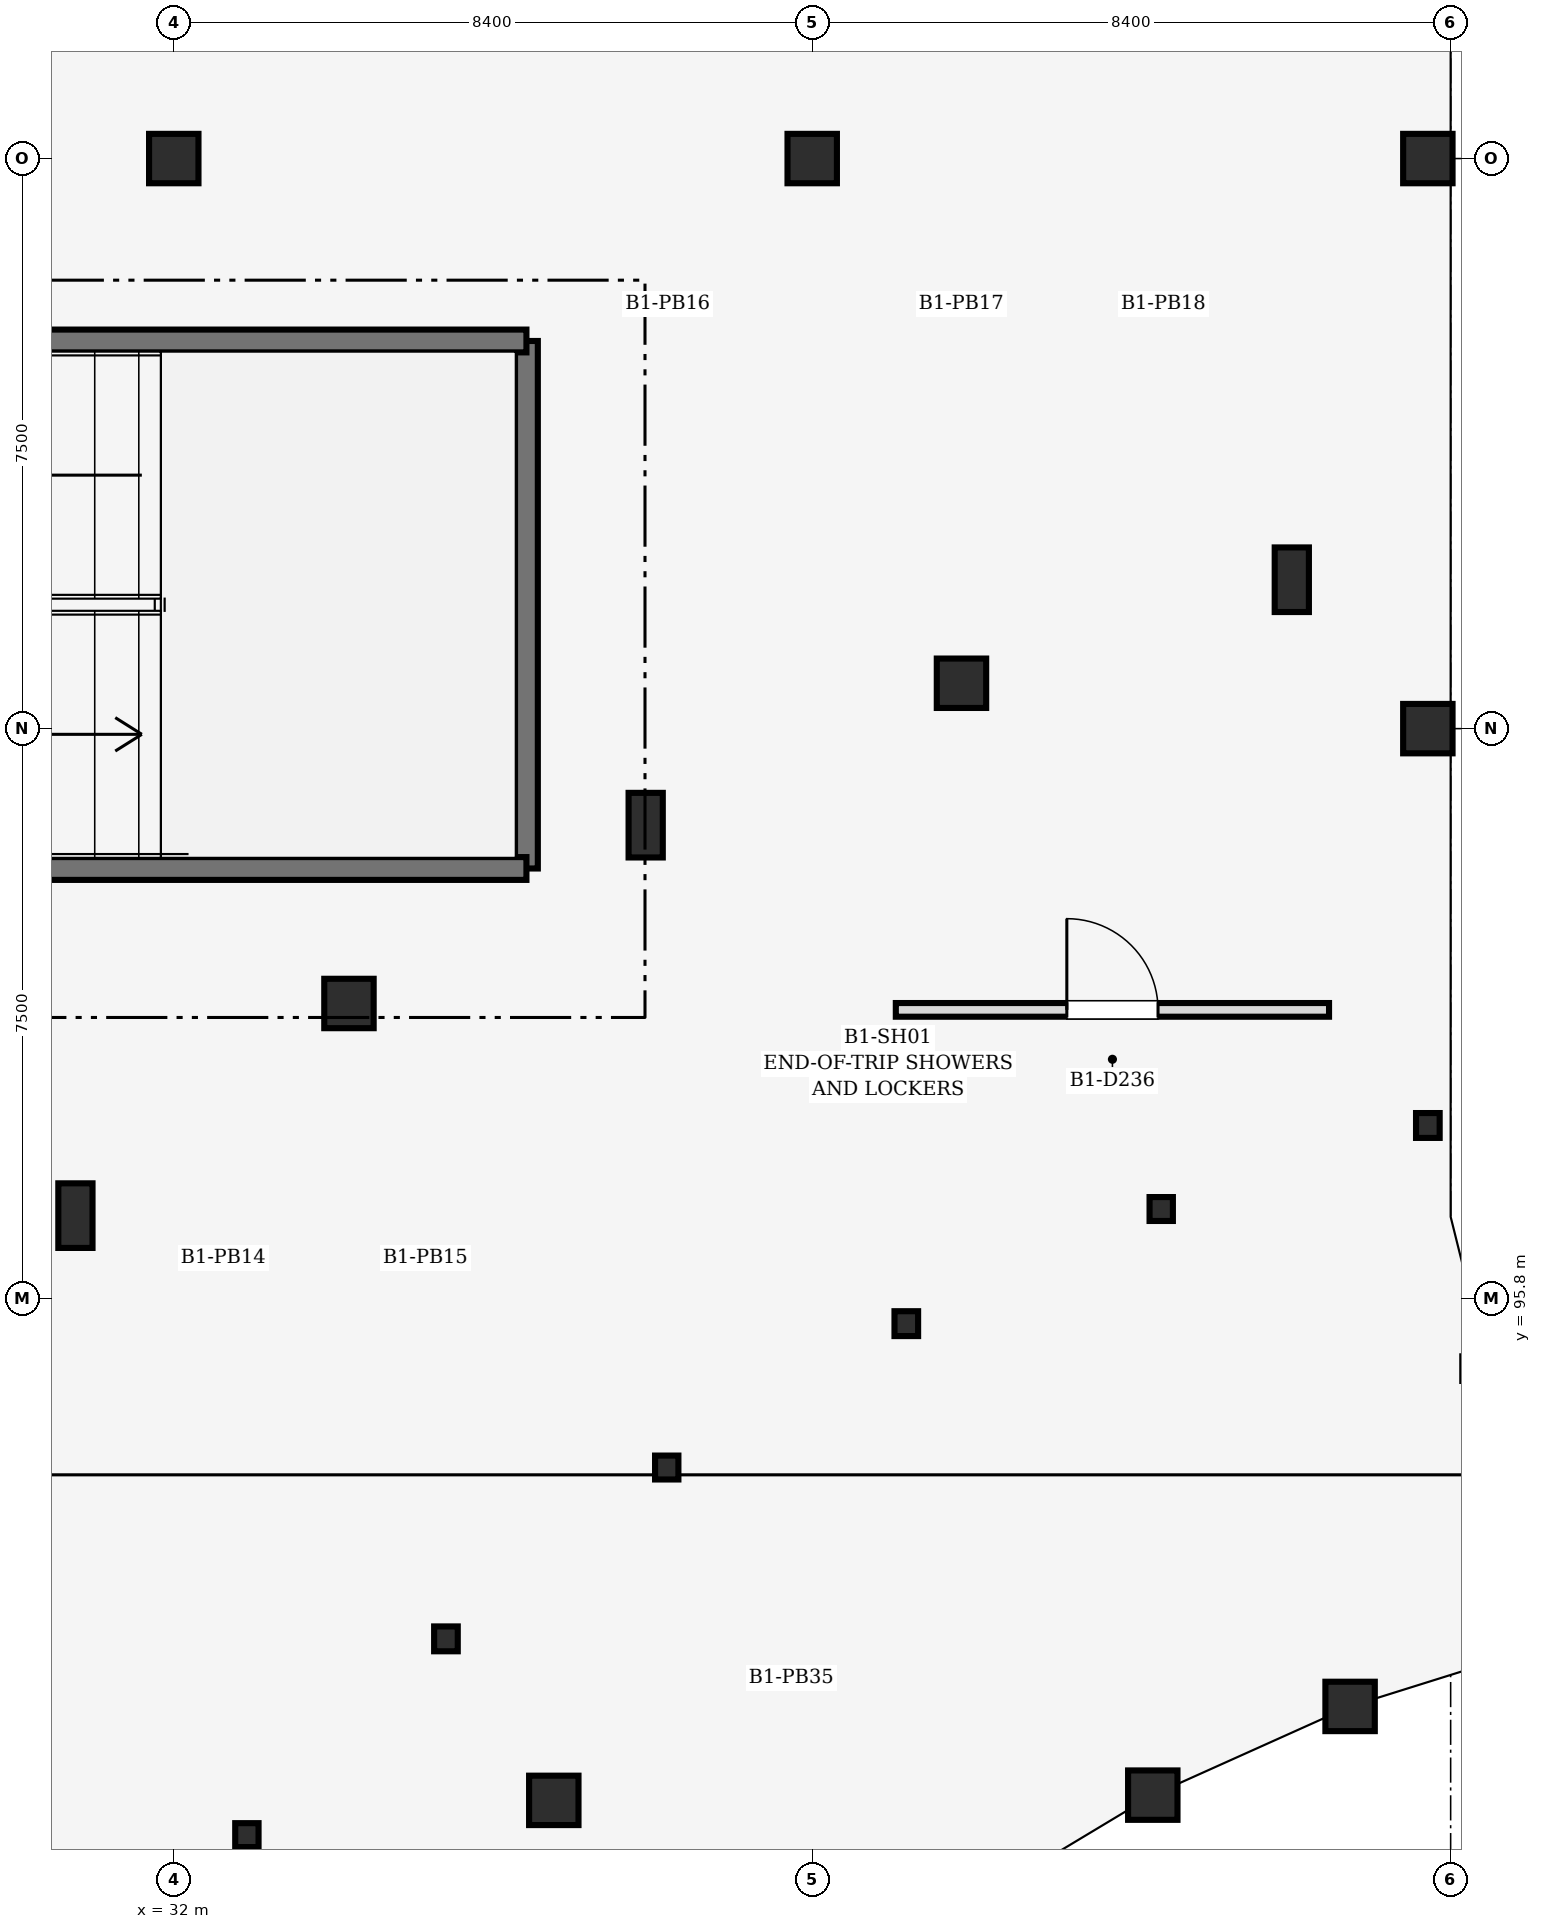
"""IFC4 building model, lengths in metres.
Left out: names, types, materials, properties, quantities, classifications, styles, units other than length and angle.
Written with IfcOpenShell. Run it as: python <this file> out.ifc"""

import sys

from ifc_helpers import new_model, si_unit, direction, frame, frame_2d, origin, origin_2d, place, context, subcontext, project, spatial, rectangle, i_section, extrude, element, fill, save


model = new_model("IFC4")
c1 = context("Model", 3, precision=1e-05, world=origin(), true_north=direction((0.0, 1.0)))
c2 = subcontext(c1, "Body", "Model", "MODEL_VIEW")
j1 = project(units=[si_unit("LENGTHUNIT", "METRE"), si_unit("PLANEANGLEUNIT", "RADIAN")], contexts=[c1])
p1 = place(None, origin())
s1 = spatial("IfcSite", under=j1, at=p1, CompositionType="ELEMENT")
p2 = place(p1, origin())
s2 = spatial("IfcBuilding", under=s1, at=p2, CompositionType="ELEMENT")
p3 = place(p2, frame((0.0, 0.0, -4.8)))
s3 = spatial("IfcBuildingStorey", under=s2, at=p3, CompositionType="ELEMENT", Elevation=-4.8)
p4 = place(p3, frame((48.5, 98.079, 0.0), z_axis=(0.0, 0.0, 1.0), x_axis=(1.0, 0.0, 0.0)))
e1 = element("IfcColumn", 1, at=p4, inside=s3, PredefinedType="COLUMN", context=c2, shape_type="SweptSolid", body=[
    extrude(i_section(OverallWidth=0.311, OverallDepth=0.327, WebThickness=0.016, FlangeThickness=0.025, at=origin_2d()), origin(), (0.0, 0.0, 1.0), 4.8),
])
p5 = place(p3, frame((46.71, 105.259, 0.0), z_axis=(0.0, 0.0, 1.0), x_axis=(1.0, 0.0, 0.0)))
e2 = element("IfcColumn", 2, at=p5, inside=s3, PredefinedType="PILASTER", context=c2, shape_type="SweptSolid", body=[
    extrude(rectangle(XDim=0.45, YDim=0.85, at=origin_2d()), origin(), (0.0, 0.0, 1.0), 4.8),
])
p6 = place(p3, frame((47.477, 90.436, 0.0), z_axis=(0.0, 0.0, 1.0), x_axis=(1.0, 0.0, 0.0)))
e3 = element("IfcColumn", 3, at=p6, inside=s3, PredefinedType="COLUMN", context=c2, shape_type="SweptSolid", body=[
    extrude(rectangle(XDim=0.65, YDim=0.65, at=origin_2d()), origin(), (0.0, 0.0, 1.0), 4.8),
])
p7 = place(p3, frame((44.992, 96.98, 0.0), z_axis=(0.0, 0.0, 1.0), x_axis=(1.0, 0.0, 0.0)))
e4 = element("IfcColumn", 4, at=p7, inside=s3, PredefinedType="COLUMN", context=c2, shape_type="SweptSolid", body=[
    extrude(i_section(OverallWidth=0.307, OverallDepth=0.315, WebThickness=0.012, FlangeThickness=0.019, at=origin_2d()), origin(), (0.0, 0.0, 1.0), 4.8),
])
for number, where, z_axis, x_axis in (
    (5, (42.364, 103.897, 0.0), (0.0, 0.0, 1.0), (1.0, 0.0, 0.0)),
    (6, (44.881, 89.269, 0.0), (0.0, 0.0, 1.0), (1.0, 0.0, 0.0)),
):
    element("IfcColumn", number, at=place(p3, frame(where, z_axis=z_axis, x_axis=x_axis)), inside=s3, PredefinedType="COLUMN", context=c2, shape_type="SweptSolid", body=[
        extrude(rectangle(XDim=0.65, YDim=0.65, at=origin_2d()), origin(), (0.0, 0.0, 1.0), 4.8),
    ])
p8 = place(p3, frame((41.638, 95.472, 0.0), z_axis=(0.0, 0.0, 1.0), x_axis=(1.0, 0.0, 0.0)))
e7 = element("IfcColumn", 7, at=p8, inside=s3, PredefinedType="COLUMN", context=c2, shape_type="SweptSolid", body=[
    extrude(i_section(OverallWidth=0.311, OverallDepth=0.327, WebThickness=0.016, FlangeThickness=0.025, at=origin_2d()), origin(), (0.0, 0.0, 1.0), 4.8),
])
p9 = place(p3, frame((38.209, 102.03, 0.0), z_axis=(0.0, 0.0, 1.0), x_axis=(1.0, 0.0, 0.0)))
e8 = element("IfcColumn", 8, at=p9, inside=s3, PredefinedType="PILASTER", context=c2, shape_type="SweptSolid", body=[
    extrude(rectangle(XDim=0.45, YDim=0.85, at=origin_2d()), origin(), (0.0, 0.0, 1.0), 4.8),
])
p10 = place(p3, frame((38.486, 93.579, 0.0), z_axis=(0.0, 0.0, 1.0), x_axis=(1.0, 0.0, 0.0)))
e9 = element("IfcColumn", 9, at=p10, inside=s3, PredefinedType="COLUMN", context=c2, shape_type="SweptSolid", body=[
    extrude(i_section(OverallWidth=0.307, OverallDepth=0.315, WebThickness=0.012, FlangeThickness=0.019, at=origin_2d()), origin(), (0.0, 0.0, 1.0), 4.8),
])
p11 = place(p3, frame((34.305, 99.684, 0.0), z_axis=(0.0, 0.0, 1.0), x_axis=(1.0, 0.0, 0.0)))
e10 = element("IfcColumn", 10, at=p11, inside=s3, PredefinedType="COLUMN", context=c2, shape_type="SweptSolid", body=[
    extrude(rectangle(XDim=0.65, YDim=0.65, at=origin_2d()), origin(), (0.0, 0.0, 1.0), 4.8),
])
p12 = place(p3, frame((35.581, 91.325, 0.0), z_axis=(0.0, 0.0, 1.0), x_axis=(1.0, 0.0, 0.0)))
e11 = element("IfcColumn", 11, at=p12, inside=s3, PredefinedType="COLUMN", context=c2, shape_type="SweptSolid", body=[
    extrude(i_section(OverallWidth=0.311, OverallDepth=0.327, WebThickness=0.016, FlangeThickness=0.025, at=origin_2d()), origin(), (0.0, 0.0, 1.0), 4.8),
])
p13 = place(p3, frame((30.706, 96.893, 0.0), z_axis=(0.0, 0.0, 1.0), x_axis=(1.0, 0.0, 0.0)))
e12 = element("IfcColumn", 12, at=p13, inside=s3, PredefinedType="PILASTER", context=c2, shape_type="SweptSolid", body=[
    extrude(rectangle(XDim=0.45, YDim=0.85, at=origin_2d()), origin(), (0.0, 0.0, 1.0), 4.8),
])
p14 = place(p3, frame((32.962, 88.743, 0.0), z_axis=(0.0, 0.0, 1.0), x_axis=(1.0, 0.0, 0.0)))
e13 = element("IfcColumn", 13, at=p14, inside=s3, PredefinedType="COLUMN", context=c2, shape_type="SweptSolid", body=[
    extrude(i_section(OverallWidth=0.307, OverallDepth=0.315, WebThickness=0.012, FlangeThickness=0.019, at=origin_2d()), origin(), (0.0, 0.0, 1.0), 4.8),
])
for number, where, z_axis, x_axis in (
    (14, (32.0, 110.8, 0.0), (0.0, 0.0, 1.0), (1.0, 0.0, 0.0)),
    (15, (40.4, 110.8, 0.0), (0.0, 0.0, 1.0), (1.0, 0.0, 0.0)),
    (16, (48.5, 103.3, 0.0), (0.0, 0.0, 1.0), (1.0, 0.0, 0.0)),
    (17, (48.5, 110.8, 0.0), (0.0, 0.0, 1.0), (1.0, 0.0, 0.0)),
    (18, (37.0, 89.2, 0.0), (0.0, 0.0, 1.0), (1.0, 0.0, 0.0)),
):
    element("IfcColumn", number, at=place(p3, frame(where, z_axis=z_axis, x_axis=x_axis)), inside=s3, PredefinedType="COLUMN", context=c2, shape_type="SweptSolid", body=[
        extrude(rectangle(XDim=0.65, YDim=0.65, at=origin_2d()), origin(), (0.0, 0.0, 1.0), 4.8),
    ])
p15 = place(p3, frame((36.64, 108.4, 0.0), z_axis=(0.0, 0.0, 1.0), x_axis=(0.0, -1.0, 0.0)))
e19 = element("IfcWall", 19, at=p15, inside=s3, PredefinedType="SHEAR", context=c2, shape_type="SweptSolid", body=[
    extrude(rectangle(XDim=6.94, YDim=0.3, at=frame_2d((3.47, 0.0))), origin(), (0.0, 0.0, 1.0), 4.52),
])
for number, where, z_axis, x_axis in (
    (20, (36.64, 101.46, 0.0), (0.0, 0.0, 1.0), (-1.0, 0.0, 0.0)),
    (21, (24.96, 108.4, 0.0), (0.0, 0.0, 1.0), (1.0, 0.0, 0.0)),
):
    element("IfcWall", number, at=place(p3, frame(where, z_axis=z_axis, x_axis=x_axis)), inside=s3, PredefinedType="SHEAR", context=c2, shape_type="SweptSolid", body=[
        extrude(rectangle(XDim=11.68, YDim=0.3, at=frame_2d((5.84, 0.0))), origin(), (0.0, 0.0, 1.0), 4.52),
    ])
p16 = place(p3, frame((41.5, 99.6, 0.0), z_axis=(0.0, 0.0, 1.0), x_axis=(1.0, 0.0, 0.0)))
e22 = element("IfcWall", 22, at=p16, inside=s3, PredefinedType="PARTITIONING", context=c2, shape_type="SweptSolid", body=[
    extrude(rectangle(XDim=5.7, YDim=0.18, at=frame_2d((2.85, 0.0))), origin(), (0.0, 0.0, 1.0), 4.465),
])
p17 = place(p16, frame((2.25, 0.0, 0.0)))
e23 = element("IfcOpeningElement", 23, at=p17, cuts=e22, PredefinedType="OPENING", context=c2, shape_type="SweptSolid", body=[
    extrude(rectangle(XDim=1.2, YDim=2.3, at=frame_2d((0.6, 1.15))), frame((0.0, 0.102, 0.0), z_axis=(0.0, -1.0, 0.0), x_axis=(1.0, 0.0, 0.0)), (0.0, 0.0, 1.0), 0.204),
])
p18 = place(p17, origin())
e24 = element("IfcDoor", 24, at=p18, inside=s3, OperationType="SINGLE_SWING_LEFT", PredefinedType="DOOR", context=c2, shape_type="SweptSolid", body=[
    extrude(rectangle(XDim=1.2, YDim=2.3, at=frame_2d((0.6, 1.15))), frame((0.0, 0.025, 0.0), z_axis=(0.0, -1.0, 0.0), x_axis=(1.0, 0.0, 0.0)), (0.0, 0.0, 1.0), 0.05),
])
fill(e23, e24)
save(model, sys.argv[1])
